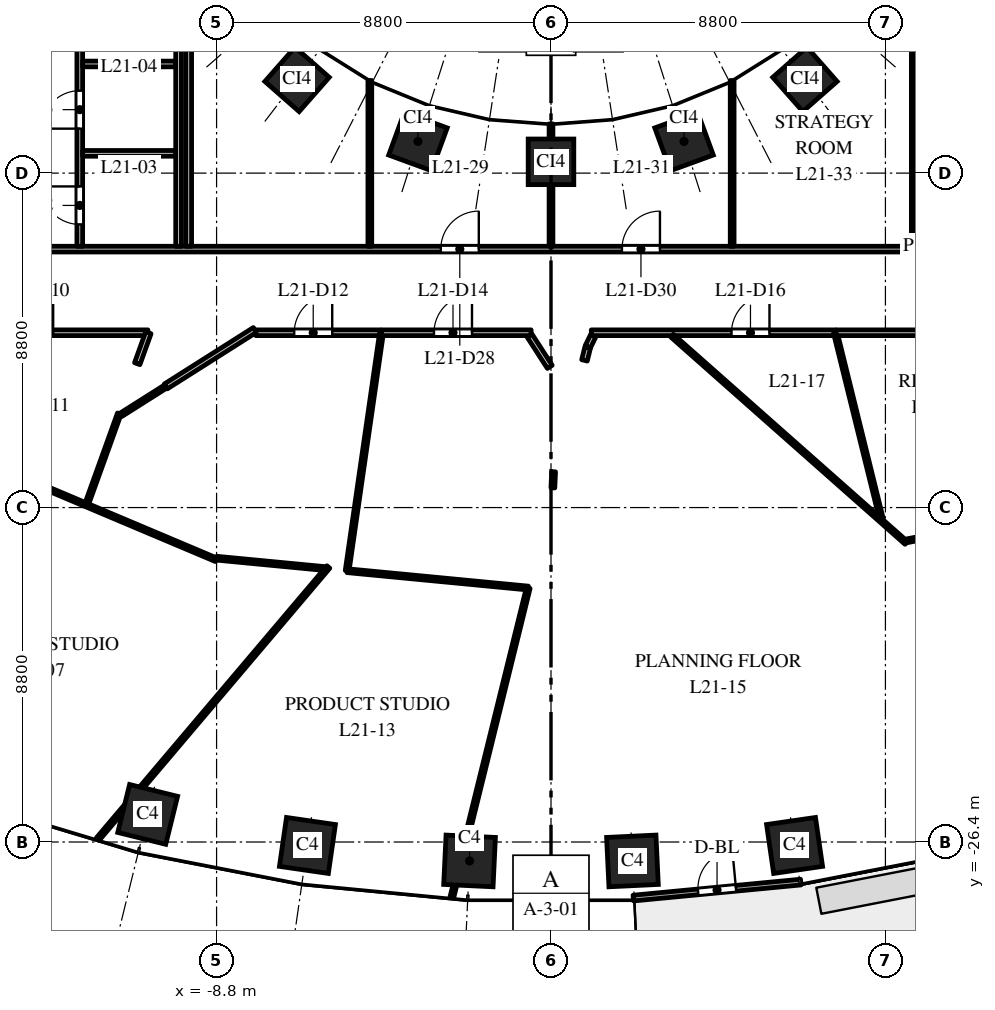
"""IFC4 building model, lengths in metres.
Left out: names, types, materials, properties, quantities, classifications, styles, units other than length and angle.
Written with IfcOpenShell. Run it as: python <this file> out.ifc"""

import sys

from ifc_helpers import new_model, si_unit, direction, frame, frame_2d, origin, origin_2d, place, context, subcontext, project, spatial, rectangle, extrude, element, fill, save


model = new_model("IFC4")
c1 = context("Model", 3, precision=1e-05, world=origin(), true_north=direction((0.0, 1.0)))
c2 = subcontext(c1, "Body", "Model", "MODEL_VIEW")
j1 = project(units=[si_unit("LENGTHUNIT", "METRE"), si_unit("PLANEANGLEUNIT", "RADIAN")], contexts=[c1])
p1 = place(None, origin())
s1 = spatial("IfcSite", under=j1, at=p1, CompositionType="ELEMENT")
p2 = place(p1, origin())
s2 = spatial("IfcBuilding", under=s1, at=p2, CompositionType="ELEMENT")
p3 = place(p2, frame((0.0, 0.0, 96.0)))
s3 = spatial("IfcBuildingStorey", under=s2, at=p3, CompositionType="ELEMENT", Elevation=96.0)
for number, where, z_axis, x_axis in (
    (1, (-10.613, -25.674, 0.0), (0.0, 0.0, 1.0), (0.971, -0.24, 0.0)),
    (2, (-6.409, -26.491, 0.0), (0.0, 0.0, 1.0), (0.99, -0.143, 0.0)),
    (3, (-2.143, -26.898, 0.0), (0.0, 0.0, 1.0), (0.999, -0.048, 0.0)),
    (4, (2.143, -26.898, 0.0), (0.0, 0.0, 1.0), (0.999, 0.048, 0.0)),
    (5, (6.409, -26.491, 0.0), (0.0, 0.0, 1.0), (0.99, 0.143, 0.0)),
):
    element("IfcColumn", number, at=place(p3, frame(where, z_axis=z_axis, x_axis=x_axis)), inside=s3, PredefinedType="COLUMN", context=c2, shape_type="SweptSolid", body=[
        extrude(rectangle(XDim=1.3, YDim=1.3, at=origin_2d()), origin(), (0.0, 0.0, 1.0), 4.0),
    ])
for number, where, z_axis, x_axis in (
    (6, (-6.682, -6.334, 0.0), (0.0, 0.0, 1.0), (0.751, -0.66, 0.0)),
    (7, (-3.501, -7.967, 0.0), (0.0, 0.0, 1.0), (0.939, -0.344, 0.0)),
    (8, (0.0, -8.503, 0.0), (0.0, 0.0, 1.0), (1.0, 0.0, 0.0)),
    (9, (3.501, -7.967, 0.0), (0.0, 0.0, 1.0), (0.939, 0.344, 0.0)),
    (10, (6.682, -6.334, 0.0), (0.0, 0.0, 1.0), (0.751, 0.66, 0.0)),
):
    element("IfcColumn", number, at=place(p3, frame(where, z_axis=z_axis, x_axis=x_axis)), inside=s3, PredefinedType="COLUMN", context=c2, shape_type="SweptSolid", body=[
        extrude(rectangle(XDim=1.2, YDim=1.2, at=origin_2d()), origin(), (0.0, 0.0, 1.0), 4.0),
    ])
p4 = place(p3, frame((2.166, -27.875, 0.0), z_axis=(0.0, 0.0, 1.0), x_axis=(0.995473879823, 0.095035543824, 0.0)))
e11 = element("IfcWall", 11, at=p4, inside=s3, PredefinedType="STANDARD", context=c2, shape_type="SweptSolid", body=[
    extrude(rectangle(XDim=4.426, YDim=0.15, at=frame_2d((2.213, 0.0))), origin(), (0.0, 0.0, 1.0), 3.7),
])
p5 = place(p4, frame((1.713, 0.0, 0.0)))
e12 = element("IfcOpeningElement", 12, at=p5, cuts=e11, PredefinedType="OPENING", context=c2, shape_type="SweptSolid", body=[
    extrude(rectangle(XDim=1.0, YDim=2.4, at=frame_2d((0.5, 1.2))), frame((0.0, 0.085, 0.0), z_axis=(0.0, -1.0, 0.0), x_axis=(1.0, 0.0, 0.0)), (0.0, 0.0, 1.0), 0.17),
])
p6 = place(p3, frame((-18.46, -14.902, 0.0), z_axis=(0.0, 0.0, 1.0), x_axis=(0.921302833786, -0.388845841508, 0.0)))
e13 = element("IfcWall", 13, at=p6, inside=s3, PredefinedType="PARTITIONING", context=c2, shape_type="SweptSolid", body=[
    extrude(rectangle(XDim=10.472, YDim=0.1, at=frame_2d((5.236, 0.0))), origin(), (0.0, 0.0, 1.0), 2.85),
])
p7 = place(p3, frame((-16.5, -13.0, 0.0), z_axis=(0.0, 0.0, 1.0), x_axis=(1.0, 0.0, 0.0)))
e14 = element("IfcWall", 14, at=p7, inside=s3, PredefinedType="PARTITIONING", context=c2, shape_type="SweptSolid", body=[
    extrude(rectangle(XDim=5.893, YDim=0.15, at=frame_2d((2.947, 0.0))), origin(), (0.0, 0.0, 1.0), 2.85),
])
p8 = place(p7, frame((2.4, 0.0, 0.0)))
e15 = element("IfcOpeningElement", 15, at=p8, cuts=e14, PredefinedType="OPENING", context=c2, shape_type="SweptSolid", body=[
    extrude(rectangle(XDim=1.0, YDim=2.1, at=frame_2d((0.5, 1.05))), frame((0.0, 0.085, 0.0), z_axis=(0.0, -1.0, 0.0), x_axis=(1.0, 0.0, 0.0)), (0.0, 0.0, 1.0), 0.17),
])
p9 = place(p3, frame((-14.3, -10.8, 0.0), z_axis=(0.0, 0.0, 1.0), x_axis=(1.0, 0.0, 0.0)))
e16 = element("IfcWall", 16, at=p9, inside=s3, PredefinedType="PARTITIONING", context=c2, shape_type="SweptSolid", body=[
    extrude(rectangle(XDim=28.6, YDim=0.15, at=frame_2d((14.3, 0.0))), origin(), (0.0, 0.0, 1.0), 2.85),
])
p10 = place(p9, frame((11.4, 0.0, 0.0)))
e17 = element("IfcOpeningElement", 17, at=p10, cuts=e16, PredefinedType="OPENING", context=c2, shape_type="SweptSolid", body=[
    extrude(rectangle(XDim=1.0, YDim=2.1, at=frame_2d((0.5, 1.05))), frame((0.0, 0.085, 0.0), z_axis=(0.0, -1.0, 0.0), x_axis=(1.0, 0.0, 0.0)), (0.0, 0.0, 1.0), 0.17),
])
p11 = place(p9, frame((16.167, 0.0, 0.0)))
e18 = element("IfcOpeningElement", 18, at=p11, cuts=e16, PredefinedType="OPENING", context=c2, shape_type="SweptSolid", body=[
    extrude(rectangle(XDim=1.0, YDim=2.1, at=frame_2d((0.5, 1.05))), frame((0.0, 0.085, 0.0), z_axis=(0.0, -1.0, 0.0), x_axis=(1.0, 0.0, 0.0)), (0.0, 0.0, 1.0), 0.17),
])
p12 = place(p3, frame((-12.4, -10.725, 0.0), z_axis=(0.0, 0.0, 1.0), x_axis=(0.0, 1.0, 0.0)))
e19 = element("IfcWall", 19, at=p12, inside=s3, PredefinedType="PARTITIONING", context=c2, shape_type="SweptSolid", body=[
    extrude(rectangle(XDim=7.065, YDim=0.15, at=frame_2d((3.533, 0.0))), origin(), (0.0, 0.0, 1.0), 2.75),
])
p13 = place(p12, frame((0.575, 0.0, 0.0)))
e20 = element("IfcOpeningElement", 20, at=p13, cuts=e19, PredefinedType="OPENING", context=c2, shape_type="SweptSolid", body=[
    extrude(rectangle(XDim=1.0, YDim=2.1, at=frame_2d((0.5, 1.05))), frame((0.0, 0.085, 0.0), z_axis=(0.0, -1.0, 0.0), x_axis=(1.0, 0.0, 0.0)), (0.0, 0.0, 1.0), 0.17),
])
p14 = place(p12, frame((3.095, 0.0, 0.0)))
e21 = element("IfcOpeningElement", 21, at=p14, cuts=e19, PredefinedType="OPENING", context=c2, shape_type="SweptSolid", body=[
    extrude(rectangle(XDim=1.0, YDim=2.1, at=frame_2d((0.5, 1.05))), frame((0.0, 0.085, 0.0), z_axis=(0.0, -1.0, 0.0), x_axis=(1.0, 0.0, 0.0)), (0.0, 0.0, 1.0), 0.17),
])
p15 = place(p12, frame((5.447, 0.0, 0.0)))
e22 = element("IfcOpeningElement", 22, at=p15, cuts=e19, PredefinedType="OPENING", context=c2, shape_type="SweptSolid", body=[
    extrude(rectangle(XDim=1.0, YDim=2.1, at=frame_2d((0.5, 1.05))), frame((0.0, 0.085, 0.0), z_axis=(0.0, -1.0, 0.0), x_axis=(1.0, 0.0, 0.0)), (0.0, 0.0, 1.0), 0.17),
])
p16 = place(p3, frame((-12.325, -8.28, 0.0), z_axis=(0.0, 0.0, 1.0), x_axis=(1.0, 0.0, 0.0)))
e23 = element("IfcWall", 23, at=p16, inside=s3, PredefinedType="PARTITIONING", context=c2, shape_type="SweptSolid", body=[
    extrude(rectangle(XDim=2.45, YDim=0.15, at=frame_2d((1.225, 0.0))), origin(), (0.0, 0.0, 1.0), 2.75),
])
p17 = place(p3, frame((-12.325, -5.928, 0.0), z_axis=(0.0, 0.0, 1.0), x_axis=(1.0, 0.0, 0.0)))
e24 = element("IfcWall", 24, at=p17, inside=s3, PredefinedType="PARTITIONING", context=c2, shape_type="SweptSolid", body=[
    extrude(rectangle(XDim=2.45, YDim=0.15, at=frame_2d((1.225, 0.0))), origin(), (0.0, 0.0, 1.0), 3.7),
])
p18 = place(p3, frame((-12.209, -17.486, 0.0), z_axis=(0.0, 0.0, 1.0), x_axis=(0.338698771758, 0.940894862357, 0.0)))
e25 = element("IfcWall", 25, at=p18, inside=s3, PredefinedType="PARTITIONING", context=c2, shape_type="SweptSolid", body=[
    extrude(rectangle(XDim=2.506, YDim=0.1, at=frame_2d((1.253, 0.0))), origin(), (0.0, 0.0, 1.0), 3.7),
])
p19 = place(p3, frame((-11.925, -26.323, 0.0), z_axis=(0.0, 0.0, 1.0), x_axis=(0.646476265577, 0.762934098101, 0.0)))
e26 = element("IfcWall", 26, at=p19, inside=s3, PredefinedType="PARTITIONING", context=c2, shape_type="SweptSolid", body=[
    extrude(rectangle(XDim=9.384, YDim=0.1, at=frame_2d((4.692, 0.0))), origin(), (0.0, 0.0, 1.0), 2.85),
])
p20 = place(p3, frame((-11.319, -15.161, 0.0), z_axis=(0.0, 0.0, 1.0), x_axis=(0.845102975348, 0.534603555037, 0.0)))
e27 = element("IfcWall", 27, at=p20, inside=s3, PredefinedType="PARTITIONING", context=c2, shape_type="SweptSolid", body=[
    extrude(rectangle(XDim=1.399, YDim=0.1, at=frame_2d((0.699, 0.0))), origin(), (0.0, 0.0, 1.0), 3.7),
])
p21 = place(p3, frame((-10.888, -13.814, 0.0), z_axis=(0.0, 0.0, 1.0), x_axis=(0.338659506624, 0.940908995904, 0.0)))
e28 = element("IfcWall", 28, at=p21, inside=s3, PredefinedType="PARTITIONING", context=c2, shape_type="SweptSolid", body=[
    extrude(rectangle(XDim=0.865, YDim=0.15, at=frame_2d((0.433, 0.0))), origin(), (0.0, 0.0, 1.0), 2.85),
])
p22 = place(p3, frame((-10.137, -14.413, 0.0), z_axis=(0.0, 0.0, 1.0), x_axis=(0.844666662568, 0.535292657475, 0.0)))
e29 = element("IfcWall", 29, at=p22, inside=s3, PredefinedType="PARTITIONING", context=c2, shape_type="SweptSolid", body=[
    extrude(rectangle(XDim=2.776, YDim=0.15, at=frame_2d((1.388, 0.0))), origin(), (0.0, 0.0, 1.0), 3.7),
])
p23 = place(p3, frame((-9.8, -10.725, 0.0), z_axis=(0.0, 0.0, 1.0), x_axis=(0.0, 1.0, 0.0)))
e30 = element("IfcWall", 30, at=p23, inside=s3, PredefinedType="PARTITIONING", context=c2, shape_type="SweptSolid", body=[
    extrude(rectangle(XDim=7.065, YDim=0.15, at=frame_2d((3.533, 0.0))), origin(), (0.0, 0.0, 1.0), 2.75),
])
p24 = place(p3, frame((-9.533, -10.725, 0.0), z_axis=(0.0, 0.0, 1.0), x_axis=(0.0, 1.0, 0.0)))
e31 = element("IfcWall", 31, at=p24, inside=s3, PredefinedType="PARTITIONING", context=c2, shape_type="SweptSolid", body=[
    extrude(rectangle(XDim=21.45, YDim=0.15, at=frame_2d((10.725, 0.0))), origin(), (0.0, 0.0, 1.0), 2.75),
])
p25 = place(p24, frame((15.575, 0.0, 0.0)))
e32 = element("IfcOpeningElement", 32, at=p25, cuts=e31, PredefinedType="OPENING", context=c2, shape_type="SweptSolid", body=[
    extrude(rectangle(XDim=1.0, YDim=2.1, at=frame_2d((0.5, 1.05))), frame((0.0, 0.085, 0.0), z_axis=(0.0, -1.0, 0.0), x_axis=(1.0, 0.0, 0.0)), (0.0, 0.0, 1.0), 0.17),
])
p26 = place(p3, frame((-8.802, -18.932, 0.0), z_axis=(0.0, 0.0, 1.0), x_axis=(0.995447320833, -0.095313332995, 0.0)))
e33 = element("IfcWall", 33, at=p26, inside=s3, PredefinedType="PARTITIONING", context=c2, shape_type="SweptSolid", body=[
    extrude(rectangle(XDim=2.856, YDim=0.1, at=frame_2d((1.428, 0.0))), origin(), (0.0, 0.0, 1.0), 2.85),
])
p27 = place(p3, frame((-7.767, -13.0, 0.0), z_axis=(0.0, 0.0, 1.0), x_axis=(1.0, 0.0, 0.0)))
e34 = element("IfcWall", 34, at=p27, inside=s3, PredefinedType="PARTITIONING", context=c2, shape_type="SweptSolid", body=[
    extrude(rectangle(XDim=3.288, YDim=0.15, at=frame_2d((1.644, 0.0))), origin(), (0.0, 0.0, 1.0), 2.85),
])
p28 = place(p27, frame((1.01, 0.0, 0.0)))
e35 = element("IfcOpeningElement", 35, at=p28, cuts=e34, PredefinedType="OPENING", context=c2, shape_type="SweptSolid", body=[
    extrude(rectangle(XDim=1.0, YDim=2.1, at=frame_2d((0.5, 1.05))), frame((0.0, 0.085, 0.0), z_axis=(0.0, -1.0, 0.0), x_axis=(1.0, 0.0, 0.0)), (0.0, 0.0, 1.0), 0.17),
])
p29 = place(p3, frame((-5.364, -19.261, 0.0), z_axis=(0.0, 0.0, 1.0), x_axis=(0.142999851524, 0.989722709886, 0.0)))
e36 = element("IfcWall", 36, at=p29, inside=s3, PredefinedType="PARTITIONING", context=c2, shape_type="SweptSolid", body=[
    extrude(rectangle(XDim=6.322, YDim=0.1, at=frame_2d((3.161, 0.0))), origin(), (0.0, 0.0, 1.0), 3.7),
])
p30 = place(p3, frame((-5.364, -19.261, 0.0), z_axis=(0.0, 0.0, 1.0), x_axis=(0.995431522243, -0.09547818874, 0.0)))
e37 = element("IfcWall", 37, at=p30, inside=s3, PredefinedType="PARTITIONING", context=c2, shape_type="SweptSolid", body=[
    extrude(rectangle(XDim=4.787, YDim=0.1, at=frame_2d((2.394, 0.0))), origin(), (0.0, 0.0, 1.0), 2.85),
])
p31 = place(p3, frame((-4.767, -10.725, 0.0), z_axis=(0.0, 0.0, 1.0), x_axis=(0.0, 1.0, 0.0)))
e38 = element("IfcWall", 38, at=p31, inside=s3, PredefinedType="PARTITIONING", context=c2, shape_type="SweptSolid", body=[
    extrude(rectangle(XDim=4.362, YDim=0.1, at=frame_2d((2.181, 0.0))), origin(), (0.0, 0.0, 1.0), 2.9),
])
p32 = place(p3, frame((-4.459, -13.0, 0.0), z_axis=(0.0, 0.0, 1.0), x_axis=(1.0, 0.0, 0.0)))
e39 = element("IfcWall", 39, at=p32, inside=s3, PredefinedType="PARTITIONING", context=c2, shape_type="SweptSolid", body=[
    extrude(rectangle(XDim=3.936, YDim=0.15, at=frame_2d((1.968, 0.0))), origin(), (0.0, 0.0, 1.0), 2.85),
])
p33 = place(p32, frame((1.38, 0.0, 0.0)))
e40 = element("IfcOpeningElement", 40, at=p33, cuts=e39, PredefinedType="OPENING", context=c2, shape_type="SweptSolid", body=[
    extrude(rectangle(XDim=1.0, YDim=2.1, at=frame_2d((0.5, 1.05))), frame((0.0, 0.085, 0.0), z_axis=(0.0, -1.0, 0.0), x_axis=(1.0, 0.0, 0.0)), (0.0, 0.0, 1.0), 0.17),
])
p34 = place(p3, frame((-2.609, -27.858, 0.0), z_axis=(0.0, 0.0, 1.0), x_axis=(0.239677840558, 0.970852477334, 0.0)))
e41 = element("IfcWall", 41, at=p34, inside=s3, PredefinedType="PARTITIONING", context=c2, shape_type="SweptSolid", body=[
    extrude(rectangle(XDim=8.385, YDim=0.1, at=frame_2d((4.193, 0.0))), origin(), (0.0, 0.0, 1.0), 2.85),
])
p35 = place(p3, frame((-0.564, -13.075, 0.0), z_axis=(0.0, 0.0, 1.0), x_axis=(0.542858683931, -0.839824058527, 0.0)))
e42 = element("IfcWall", 42, at=p35, inside=s3, PredefinedType="PARTITIONING", context=c2, shape_type="SweptSolid", body=[
    extrude(rectangle(XDim=0.98, YDim=0.15, at=frame_2d((0.49, 0.0))), origin(), (0.0, 0.0, 1.0), 3.7),
])
p36 = place(p3, frame((0.0, -10.725, 0.0), z_axis=(0.0, 0.0, 1.0), x_axis=(0.0, 1.0, 0.0)))
e43 = element("IfcWall", 43, at=p36, inside=s3, PredefinedType="PARTITIONING", context=c2, shape_type="SweptSolid", body=[
    extrude(rectangle(XDim=3.221, YDim=0.1, at=frame_2d((1.611, 0.0))), origin(), (0.0, 0.0, 1.0), 3.7),
])
p37 = place(p3, frame((0.049, -17.081, 0.0), z_axis=(0.0, 0.0, 1.0), x_axis=(0.047263912187, 0.998882436829, 0.0)))
e44 = element("IfcWall", 44, at=p37, inside=s3, PredefinedType="PARTITIONING", context=c2, shape_type="SweptSolid", body=[
    extrude(rectangle(XDim=0.424, YDim=0.1, at=frame_2d((0.212, 0.0))), origin(), (0.0, 0.0, 1.0), 3.7),
])
p38 = place(p3, frame((0.881, -13.727, 0.0), z_axis=(0.0, 0.0, 1.0), x_axis=(0.239099704585, 0.970995021237, 0.0)))
e45 = element("IfcWall", 45, at=p38, inside=s3, PredefinedType="PARTITIONING", context=c2, shape_type="SweptSolid", body=[
    extrude(rectangle(XDim=0.351, YDim=0.15, at=frame_2d((0.176, 0.0))), origin(), (0.0, 0.0, 1.0), 3.7),
])
p39 = place(p3, frame((0.969, -13.369, 0.0), z_axis=(0.0, 0.0, 1.0), x_axis=(0.440240923942, 0.897879685084, 0.0)))
e46 = element("IfcWall", 46, at=p39, inside=s3, PredefinedType="PARTITIONING", context=c2, shape_type="SweptSolid", body=[
    extrude(rectangle(XDim=0.323, YDim=0.15, at=frame_2d((0.161, 0.0))), origin(), (0.0, 0.0, 1.0), 3.7),
])
p40 = place(p3, frame((1.061, -13.0, 0.0), z_axis=(0.0, 0.0, 1.0), x_axis=(1.0, 0.0, 0.0)))
e47 = element("IfcWall", 47, at=p40, inside=s3, PredefinedType="PARTITIONING", context=c2, shape_type="SweptSolid", body=[
    extrude(rectangle(XDim=6.422, YDim=0.15, at=frame_2d((3.211, 0.0))), origin(), (0.0, 0.0, 1.0), 2.85),
])
p41 = place(p40, frame((3.688, 0.0, 0.0)))
e48 = element("IfcOpeningElement", 48, at=p41, cuts=e47, PredefinedType="OPENING", context=c2, shape_type="SweptSolid", body=[
    extrude(rectangle(XDim=1.0, YDim=2.1, at=frame_2d((0.5, 1.05))), frame((0.0, 0.085, 0.0), z_axis=(0.0, -1.0, 0.0), x_axis=(1.0, 0.0, 0.0)), (0.0, 0.0, 1.0), 0.17),
])
p42 = place(p3, frame((3.187, -13.078, 0.0), z_axis=(0.0, 0.0, 1.0), x_axis=(0.748992031217, -0.662579004477, 0.0)))
e49 = element("IfcWall", 49, at=p42, inside=s3, PredefinedType="PARTITIONING", context=c2, shape_type="SweptSolid", body=[
    extrude(rectangle(XDim=8.227, YDim=0.1, at=frame_2d((4.114, 0.0))), origin(), (0.0, 0.0, 1.0), 2.85),
])
p43 = place(p3, frame((4.767, -10.725, 0.0), z_axis=(0.0, 0.0, 1.0), x_axis=(0.0, 1.0, 0.0)))
e50 = element("IfcWall", 50, at=p43, inside=s3, PredefinedType="PARTITIONING", context=c2, shape_type="SweptSolid", body=[
    extrude(rectangle(XDim=4.362, YDim=0.1, at=frame_2d((2.181, 0.0))), origin(), (0.0, 0.0, 1.0), 2.85),
])
p44 = place(p3, frame((7.483, -13.0, 0.0), z_axis=(0.0, 0.0, 1.0), x_axis=(0.239743843509, -0.970836180568, 0.0)))
e51 = element("IfcWall", 51, at=p44, inside=s3, PredefinedType="PARTITIONING", context=c2, shape_type="SweptSolid", body=[
    extrude(rectangle(XDim=5.022, YDim=0.1, at=frame_2d((2.511, 0.0))), origin(), (0.0, 0.0, 1.0), 3.7),
])
p45 = place(p3, frame((7.499, -13.0, 0.0), z_axis=(0.0, 0.0, 1.0), x_axis=(1.0, 0.0, 0.0)))
e52 = element("IfcWall", 52, at=p45, inside=s3, PredefinedType="PARTITIONING", context=c2, shape_type="SweptSolid", body=[
    extrude(rectangle(XDim=9.001, YDim=0.15, at=frame_2d((4.5, 0.0))), origin(), (0.0, 0.0, 1.0), 2.85),
])
p46 = place(p45, frame((2.634, 0.0, 0.0)))
e53 = element("IfcOpeningElement", 53, at=p46, cuts=e52, PredefinedType="OPENING", context=c2, shape_type="SweptSolid", body=[
    extrude(rectangle(XDim=1.0, YDim=2.1, at=frame_2d((0.5, 1.05))), frame((0.0, 0.085, 0.0), z_axis=(0.0, -1.0, 0.0), x_axis=(1.0, 0.0, 0.0)), (0.0, 0.0, 1.0), 0.17),
])
p47 = place(p45, frame((7.263, 0.0, 0.0)))
e54 = element("IfcOpeningElement", 54, at=p47, cuts=e52, PredefinedType="OPENING", context=c2, shape_type="SweptSolid", body=[
    extrude(rectangle(XDim=1.0, YDim=2.1, at=frame_2d((0.5, 1.05))), frame((0.0, 0.085, 0.0), z_axis=(0.0, -1.0, 0.0), x_axis=(1.0, 0.0, 0.0)), (0.0, 0.0, 1.0), 0.17),
])
p48 = place(p3, frame((9.364, -18.475, 0.0), z_axis=(0.0, 0.0, 1.0), x_axis=(0.98152602631, 0.191328669247, 0.0)))
e55 = element("IfcWall", 55, at=p48, inside=s3, PredefinedType="PARTITIONING", context=c2, shape_type="SweptSolid", body=[
    extrude(rectangle(XDim=3.189, YDim=0.1, at=frame_2d((1.594, 0.0))), origin(), (0.0, 0.0, 1.0), 2.85),
])
p49 = place(p3, frame((9.533, -10.725, 0.0), z_axis=(0.0, 0.0, 1.0), x_axis=(0.0, 1.0, 0.0)))
e56 = element("IfcWall", 56, at=p49, inside=s3, PredefinedType="PARTITIONING", context=c2, shape_type="SweptSolid", body=[
    extrude(rectangle(XDim=21.45, YDim=0.1, at=frame_2d((10.725, 0.0))), origin(), (0.0, 0.0, 1.0), 2.75),
])
p50 = place(p5, origin())
e57 = element("IfcDoor", 57, at=p50, inside=s3, OperationType="SINGLE_SWING_RIGHT", PredefinedType="DOOR", context=c2, shape_type="SweptSolid", body=[
    extrude(rectangle(XDim=1.0, YDim=2.4, at=frame_2d((0.5, 1.2))), frame((0.0, 0.025, 0.0), z_axis=(0.0, -1.0, 0.0), x_axis=(1.0, 0.0, 0.0)), (0.0, 0.0, 1.0), 0.05),
])
fill(e12, e57)
p51 = place(p13, origin())
e58 = element("IfcDoor", 58, at=p51, inside=s3, OperationType="SINGLE_SWING_RIGHT", PredefinedType="DOOR", context=c2, shape_type="SweptSolid", body=[
    extrude(rectangle(XDim=1.0, YDim=2.1, at=frame_2d((0.5, 1.05))), frame((0.0, 0.025, 0.0), z_axis=(0.0, -1.0, 0.0), x_axis=(1.0, 0.0, 0.0)), (0.0, 0.0, 1.0), 0.05),
])
fill(e20, e58)
p52 = place(p14, origin())
e59 = element("IfcDoor", 59, at=p52, inside=s3, OperationType="SINGLE_SWING_LEFT", PredefinedType="DOOR", context=c2, shape_type="SweptSolid", body=[
    extrude(rectangle(XDim=1.0, YDim=2.1, at=frame_2d((0.5, 1.05))), frame((0.0, 0.025, 0.0), z_axis=(0.0, -1.0, 0.0), x_axis=(1.0, 0.0, 0.0)), (0.0, 0.0, 1.0), 0.05),
])
fill(e21, e59)
p53 = place(p8, origin())
e60 = element("IfcDoor", 60, at=p53, inside=s3, OperationType="SINGLE_SWING_RIGHT", PredefinedType="DOOR", context=c2, shape_type="SweptSolid", body=[
    extrude(rectangle(XDim=1.0, YDim=2.1, at=frame_2d((0.5, 1.05))), frame((0.0, 0.025, 0.0), z_axis=(0.0, -1.0, 0.0), x_axis=(1.0, 0.0, 0.0)), (0.0, 0.0, 1.0), 0.05),
])
fill(e15, e60)
p54 = place(p28, origin())
e61 = element("IfcDoor", 61, at=p54, inside=s3, OperationType="SINGLE_SWING_RIGHT", PredefinedType="DOOR", context=c2, shape_type="SweptSolid", body=[
    extrude(rectangle(XDim=1.0, YDim=2.1, at=frame_2d((0.5, 1.05))), frame((0.0, 0.025, 0.0), z_axis=(0.0, -1.0, 0.0), x_axis=(1.0, 0.0, 0.0)), (0.0, 0.0, 1.0), 0.05),
])
fill(e35, e61)
p55 = place(p33, origin())
e62 = element("IfcDoor", 62, at=p55, inside=s3, OperationType="SINGLE_SWING_RIGHT", PredefinedType="DOOR", context=c2, shape_type="SweptSolid", body=[
    extrude(rectangle(XDim=1.0, YDim=2.1, at=frame_2d((0.5, 1.05))), frame((0.0, 0.025, 0.0), z_axis=(0.0, -1.0, 0.0), x_axis=(1.0, 0.0, 0.0)), (0.0, 0.0, 1.0), 0.05),
])
fill(e40, e62)
p56 = place(p41, origin())
e63 = element("IfcDoor", 63, at=p56, inside=s3, OperationType="SINGLE_SWING_RIGHT", PredefinedType="DOOR", context=c2, shape_type="SweptSolid", body=[
    extrude(rectangle(XDim=1.0, YDim=2.1, at=frame_2d((0.5, 1.05))), frame((0.0, 0.025, 0.0), z_axis=(0.0, -1.0, 0.0), x_axis=(1.0, 0.0, 0.0)), (0.0, 0.0, 1.0), 0.05),
])
fill(e48, e63)
p57 = place(p10, origin())
e64 = element("IfcDoor", 64, at=p57, inside=s3, OperationType="SINGLE_SWING_RIGHT", PredefinedType="DOOR", context=c2, shape_type="SweptSolid", body=[
    extrude(rectangle(XDim=1.0, YDim=2.1, at=frame_2d((0.5, 1.05))), frame((0.0, 0.025, 0.0), z_axis=(0.0, -1.0, 0.0), x_axis=(1.0, 0.0, 0.0)), (0.0, 0.0, 1.0), 0.05),
])
fill(e17, e64)
p58 = place(p11, origin())
e65 = element("IfcDoor", 65, at=p58, inside=s3, OperationType="SINGLE_SWING_RIGHT", PredefinedType="DOOR", context=c2, shape_type="SweptSolid", body=[
    extrude(rectangle(XDim=1.0, YDim=2.1, at=frame_2d((0.5, 1.05))), frame((0.0, 0.025, 0.0), z_axis=(0.0, -1.0, 0.0), x_axis=(1.0, 0.0, 0.0)), (0.0, 0.0, 1.0), 0.05),
])
fill(e18, e65)
save(model, sys.argv[1])
